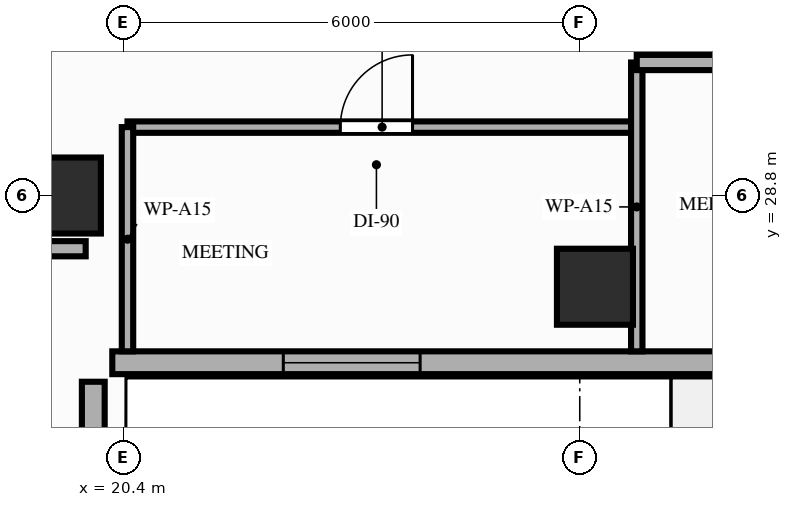
"""IFC4 building model, lengths in metres.
Left out: names, types, materials, properties, quantities, classifications, styles, units other than length and angle.
Written with IfcOpenShell. Run it as: python <this file> out.ifc"""

import sys

from ifc_helpers import new_model, si_unit, direction, frame, frame_2d, origin, origin_2d, place, context, subcontext, project, spatial, rectangle, extrude, element, fill, save


model = new_model("IFC4")
c1 = context("Model", 3, precision=1e-05, world=origin(), true_north=direction((0.0, 1.0)))
c2 = subcontext(c1, "Body", "Model", "MODEL_VIEW")
j1 = project(units=[si_unit("LENGTHUNIT", "METRE"), si_unit("PLANEANGLEUNIT", "RADIAN")], contexts=[c1])
p1 = place(None, origin())
s1 = spatial("IfcSite", under=j1, at=p1, CompositionType="ELEMENT")
p2 = place(p1, origin())
s2 = spatial("IfcBuilding", under=s1, at=p2, CompositionType="ELEMENT")
p3 = place(p2, frame((0.0, 0.0, 110.6)))
s3 = spatial("IfcBuildingStorey", under=s2, at=p3, CompositionType="ELEMENT", Elevation=110.6)
for number, where, z_axis, x_axis in (
    (1, (19.6, 28.8, 0.0), (0.0, 0.0, 1.0), (1.0, 0.0, 0.0)),
    (2, (26.6, 27.6, 0.0), (0.0, 0.0, 1.0), (1.0, 0.0, 0.0)),
):
    element("IfcColumn", number, at=place(p3, frame(where, z_axis=z_axis, x_axis=x_axis)), inside=s3, PredefinedType="COLUMN", context=c2, shape_type="SweptSolid", body=[
        extrude(rectangle(XDim=1.0, YDim=1.0, at=origin_2d()), origin(), (0.0, 0.0, 1.0), 3.2),
    ])
p4 = place(p3, frame((20.0, 8.8, 0.0), z_axis=(0.0, 0.0, 1.0), x_axis=(0.0, 1.0, 0.0)))
e3 = element("IfcWall", 3, at=p4, inside=s3, PredefinedType="STANDARD", context=c2, shape_type="SweptSolid", body=[
    extrude(rectangle(XDim=17.55, YDim=0.3, at=frame_2d((8.775, 0.0))), origin(), (0.0, 0.0, 1.0), 2.4),
])
p5 = place(p4, frame((5.95, 0.0, 0.85)))
e4 = element("IfcOpeningElement", 4, at=p5, cuts=e3, PredefinedType="OPENING", context=c2, shape_type="SweptSolid", body=[
    extrude(rectangle(XDim=1.8, YDim=1.3, at=frame_2d((0.9, 0.65))), frame((0.0, 0.16, 0.0), z_axis=(0.0, -1.0, 0.0), x_axis=(1.0, 0.0, 0.0)), (0.0, 0.0, 1.0), 0.32),
])
p6 = place(p4, frame((11.0, 0.0, 0.85)))
e5 = element("IfcOpeningElement", 5, at=p6, cuts=e3, PredefinedType="OPENING", context=c2, shape_type="SweptSolid", body=[
    extrude(rectangle(XDim=1.8, YDim=1.3, at=frame_2d((0.9, 0.65))), frame((0.0, 0.16, 0.0), z_axis=(0.0, -1.0, 0.0), x_axis=(1.0, 0.0, 0.0)), (0.0, 0.0, 1.0), 0.32),
])
p7 = place(p3, frame((20.25, 26.6, 0.0), z_axis=(0.0, 0.0, 1.0), x_axis=(1.0, 0.0, 0.0)))
e6 = element("IfcWall", 6, at=p7, inside=s3, PredefinedType="STANDARD", context=c2, shape_type="SweptSolid", body=[
    extrude(rectangle(XDim=26.15, YDim=0.3, at=frame_2d((13.075, 0.0))), origin(), (0.0, 0.0, 1.0), 2.7),
])
p8 = place(p7, frame((8.0, 0.0, 0.0)))
e7 = element("IfcOpeningElement", 7, at=p8, cuts=e6, PredefinedType="OPENING", context=c2, shape_type="SweptSolid", body=[
    extrude(rectangle(XDim=1.3, YDim=2.08, at=frame_2d((0.65, 1.04))), frame((0.0, 0.16, 0.0), z_axis=(0.0, -1.0, 0.0), x_axis=(1.0, 0.0, 0.0)), (0.0, 0.0, 1.0), 0.32),
])
p9 = place(p7, frame((22.5, 0.0, 0.0)))
e8 = element("IfcOpeningElement", 8, at=p9, cuts=e6, PredefinedType="OPENING", context=c2, shape_type="SweptSolid", body=[
    extrude(rectangle(XDim=1.3, YDim=2.08, at=frame_2d((0.65, 1.04))), frame((0.0, 0.16, 0.0), z_axis=(0.0, -1.0, 0.0), x_axis=(1.0, 0.0, 0.0)), (0.0, 0.0, 1.0), 0.32),
])
p10 = place(p7, frame((2.25, 0.0, 0.85)))
e9 = element("IfcOpeningElement", 9, at=p10, cuts=e6, PredefinedType="OPENING", context=c2, shape_type="SweptSolid", body=[
    extrude(rectangle(XDim=1.8, YDim=1.6, at=frame_2d((0.9, 0.8))), frame((0.0, 0.16, 0.0), z_axis=(0.0, -1.0, 0.0), x_axis=(1.0, 0.0, 0.0)), (0.0, 0.0, 1.0), 0.32),
])
p11 = place(p7, frame((13.65, 0.0, 0.85)))
e10 = element("IfcOpeningElement", 10, at=p11, cuts=e6, PredefinedType="OPENING", context=c2, shape_type="SweptSolid", body=[
    extrude(rectangle(XDim=1.8, YDim=1.6, at=frame_2d((0.9, 0.8))), frame((0.0, 0.16, 0.0), z_axis=(0.0, -1.0, 0.0), x_axis=(1.0, 0.0, 0.0)), (0.0, 0.0, 1.0), 0.32),
])
p12 = place(p3, frame((14.66, 28.1, 0.0), z_axis=(0.0, 0.0, 1.0), x_axis=(1.0, 0.0, 0.0)))
e11 = element("IfcWall", 11, at=p12, inside=s3, PredefinedType="PARTITIONING", context=c2, shape_type="SweptSolid", body=[
    extrude(rectangle(XDim=5.24, YDim=0.2, at=frame_2d((2.62, 0.0))), origin(), (0.0, 0.0, 1.0), 2.4),
])
p13 = place(p3, frame((20.45, 29.7, 0.0), z_axis=(0.0, 0.0, 1.0), x_axis=(1.0, 0.0, 0.0)))
e12 = element("IfcWall", 12, at=p13, inside=s3, PredefinedType="PARTITIONING", context=c2, shape_type="SweptSolid", body=[
    extrude(rectangle(XDim=6.7, YDim=0.15, at=frame_2d((3.35, 0.0))), origin(), (0.0, 0.0, 1.0), 3.02),
])
p14 = place(p13, frame((2.8, 0.0, 0.0)))
e13 = element("IfcOpeningElement", 13, at=p14, cuts=e12, PredefinedType="OPENING", context=c2, shape_type="SweptSolid", body=[
    extrude(rectangle(XDim=0.95, YDim=2.15, at=frame_2d((0.475, 1.075))), frame((0.0, 0.085, 0.0), z_axis=(0.0, -1.0, 0.0), x_axis=(1.0, 0.0, 0.0)), (0.0, 0.0, 1.0), 0.17),
])
p15 = place(p3, frame((20.45, 26.75, 0.0), z_axis=(0.0, 0.0, 1.0), x_axis=(0.0, 1.0, 0.0)))
e14 = element("IfcWall", 14, at=p15, inside=s3, PredefinedType="PARTITIONING", context=c2, shape_type="SweptSolid", body=[
    extrude(rectangle(XDim=2.95, YDim=0.15, at=frame_2d((1.475, 0.0))), origin(), (0.0, 0.0, 1.0), 2.4),
])
p16 = place(p3, frame((27.15, 26.75, 0.0), z_axis=(0.0, 0.0, 1.0), x_axis=(0.0, 1.0, 0.0)))
e15 = element("IfcWall", 15, at=p16, inside=s3, PredefinedType="PARTITIONING", context=c2, shape_type="SweptSolid", body=[
    extrude(rectangle(XDim=3.8, YDim=0.15, at=frame_2d((1.9, 0.0))), origin(), (0.0, 0.0, 1.0), 2.4),
])
p17 = place(p3, frame((27.15, 30.55, 0.0), z_axis=(0.0, 0.0, 1.0), x_axis=(1.0, 0.0, 0.0)))
e16 = element("IfcWall", 16, at=p17, inside=s3, PredefinedType="PARTITIONING", context=c2, shape_type="SweptSolid", body=[
    extrude(rectangle(XDim=13.95, YDim=0.2, at=frame_2d((6.975, 0.0))), origin(), (0.0, 0.0, 1.0), 2.4),
])
p18 = place(p17, frame((2.24, 0.0, 0.0)))
e17 = element("IfcOpeningElement", 17, at=p18, cuts=e16, PredefinedType="OPENING", context=c2, shape_type="SweptSolid", body=[
    extrude(rectangle(XDim=0.95, YDim=2.15, at=frame_2d((0.475, 1.075))), frame((0.0, 0.11, 0.0), z_axis=(0.0, -1.0, 0.0), x_axis=(1.0, 0.0, 0.0)), (0.0, 0.0, 1.0), 0.22),
])
p19 = place(p17, frame((6.92, 0.0, 0.0)))
e18 = element("IfcOpeningElement", 18, at=p19, cuts=e16, PredefinedType="OPENING", context=c2, shape_type="SweptSolid", body=[
    extrude(rectangle(XDim=0.95, YDim=2.15, at=frame_2d((0.475, 1.075))), frame((0.0, 0.11, 0.0), z_axis=(0.0, -1.0, 0.0), x_axis=(1.0, 0.0, 0.0)), (0.0, 0.0, 1.0), 0.22),
])
p20 = place(p17, frame((11.17, 0.0, 0.0)))
e19 = element("IfcOpeningElement", 19, at=p20, cuts=e16, PredefinedType="OPENING", context=c2, shape_type="SweptSolid", body=[
    extrude(rectangle(XDim=0.95, YDim=2.15, at=frame_2d((0.475, 1.075))), frame((0.0, 0.11, 0.0), z_axis=(0.0, -1.0, 0.0), x_axis=(1.0, 0.0, 0.0)), (0.0, 0.0, 1.0), 0.22),
])
p21 = place(p10, origin())
e20 = element("IfcWindow", 20, at=p21, inside=s3, PartitioningType="SINGLE_PANEL", PredefinedType="WINDOW", context=c2, shape_type="SweptSolid", body=[
    extrude(rectangle(XDim=1.8, YDim=1.6, at=frame_2d((0.9, 0.8))), frame((0.0, 0.03, 0.0), z_axis=(0.0, -1.0, 0.0), x_axis=(1.0, 0.0, 0.0)), (0.0, 0.0, 1.0), 0.06),
])
fill(e9, e20)
p22 = place(p14, origin())
e21 = element("IfcDoor", 21, at=p22, inside=s3, OperationType="SINGLE_SWING_RIGHT", PredefinedType="DOOR", context=c2, shape_type="SweptSolid", body=[
    extrude(rectangle(XDim=0.95, YDim=2.15, at=frame_2d((0.475, 1.075))), frame((0.0, 0.025, 0.0), z_axis=(0.0, -1.0, 0.0), x_axis=(1.0, 0.0, 0.0)), (0.0, 0.0, 1.0), 0.05),
])
fill(e13, e21)
save(model, sys.argv[1])
